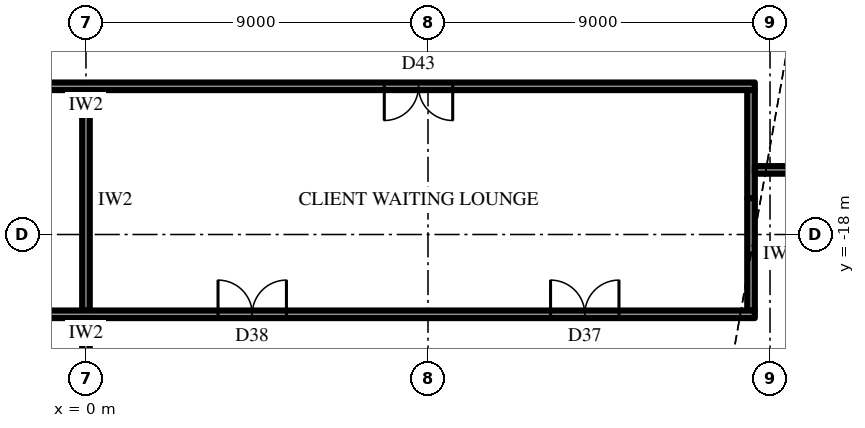
"""IFC4 building model, lengths in metres.
Left out: names, types, materials, properties, quantities, classifications, styles, units other than length and angle.
Written with IfcOpenShell. Run it as: python <this file> out.ifc"""

import sys

from ifc_helpers import new_model, si_unit, direction, frame, frame_2d, origin, place, context, subcontext, project, spatial, rectangle, extrude, element, fill, save


model = new_model("IFC4")
c1 = context("Model", 3, precision=1e-05, world=origin(), true_north=direction((0.0, 1.0)))
c2 = subcontext(c1, "Body", "Model", "MODEL_VIEW")
j1 = project(units=[si_unit("LENGTHUNIT", "METRE"), si_unit("PLANEANGLEUNIT", "RADIAN")], contexts=[c1])
p1 = place(None, origin())
s1 = spatial("IfcSite", under=j1, at=p1, CompositionType="ELEMENT")
p2 = place(p1, origin())
s2 = spatial("IfcBuilding", under=s1, at=p2, CompositionType="ELEMENT")
p3 = place(p2, frame((0.0, 0.0, 210.5)))
s3 = spatial("IfcBuildingStorey", under=s2, at=p3, CompositionType="ELEMENT", Elevation=210.5)
p4 = place(p3, frame((18.057, -26.425, 0.0), z_axis=(0.0, 0.0, 1.0), x_axis=(0.500001051461, 0.866024796723, 0.0)))
e1 = element("IfcWall", 1, at=p4, inside=s3, PredefinedType="SOLIDWALL", context=c2, shape_type="SweptSolid", body=[
    extrude(rectangle(XDim=27.713, YDim=0.3, at=frame_2d((13.856, 0.0))), origin(), (0.0, 0.0, 1.0), 2.8),
])
p5 = place(p4, frame((1.309, 0.0, 0.6)))
e2 = element("IfcOpeningElement", 2, at=p5, cuts=e1, PredefinedType="OPENING", context=c2, shape_type="SweptSolid", body=[
    extrude(rectangle(XDim=2.0, YDim=1.95, at=frame_2d((1.0, 0.975))), frame((0.0, 0.16, 0.0), z_axis=(0.0, -1.0, 0.0), x_axis=(1.0, 0.0, 0.0)), (0.0, 0.0, 1.0), 0.32),
])
p6 = place(p4, frame((5.928, 0.0, 0.6)))
e3 = element("IfcOpeningElement", 3, at=p6, cuts=e1, PredefinedType="OPENING", context=c2, shape_type="SweptSolid", body=[
    extrude(rectangle(XDim=2.0, YDim=1.95, at=frame_2d((1.0, 0.975))), frame((0.0, 0.16, 0.0), z_axis=(0.0, -1.0, 0.0), x_axis=(1.0, 0.0, 0.0)), (0.0, 0.0, 1.0), 0.32),
])
p7 = place(p4, frame((10.947, 0.0, 0.0)))
e4 = element("IfcOpeningElement", 4, at=p7, cuts=e1, PredefinedType="OPENING", context=c2, shape_type="SweptSolid", body=[
    extrude(rectangle(XDim=1.2, YDim=2.4, at=frame_2d((0.6, 1.2))), frame((0.0, 0.16, 0.0), z_axis=(0.0, -1.0, 0.0), x_axis=(1.0, 0.0, 0.0)), (0.0, 0.0, 1.0), 0.32),
])
p8 = place(p4, frame((15.166, 0.0, 0.6)))
e5 = element("IfcOpeningElement", 5, at=p8, cuts=e1, PredefinedType="OPENING", context=c2, shape_type="SweptSolid", body=[
    extrude(rectangle(XDim=2.0, YDim=1.95, at=frame_2d((1.0, 0.975))), frame((0.0, 0.16, 0.0), z_axis=(0.0, -1.0, 0.0), x_axis=(1.0, 0.0, 0.0)), (0.0, 0.0, 1.0), 0.32),
])
p9 = place(p4, frame((19.785, 0.0, 0.6)))
e6 = element("IfcOpeningElement", 6, at=p9, cuts=e1, PredefinedType="OPENING", context=c2, shape_type="SweptSolid", body=[
    extrude(rectangle(XDim=2.0, YDim=1.95, at=frame_2d((1.0, 0.975))), frame((0.0, 0.16, 0.0), z_axis=(0.0, -1.0, 0.0), x_axis=(1.0, 0.0, 0.0)), (0.0, 0.0, 1.0), 0.32),
])
p10 = place(p4, frame((24.403, 0.0, 0.6)))
e7 = element("IfcOpeningElement", 7, at=p10, cuts=e1, PredefinedType="OPENING", context=c2, shape_type="SweptSolid", body=[
    extrude(rectangle(XDim=2.0, YDim=1.95, at=frame_2d((1.0, 0.975))), frame((0.0, 0.16, 0.0), z_axis=(0.0, -1.0, 0.0), x_axis=(1.0, 0.0, 0.0)), (0.0, 0.0, 1.0), 0.32),
])
p11 = place(p3, frame((17.6, -14.1, 0.0), z_axis=(0.0, 0.0, 1.0), x_axis=(-1.0, 0.0, 0.0)))
e8 = element("IfcWall", 8, at=p11, inside=s3, PredefinedType="PARTITIONING", context=c2, shape_type="SweptSolid", body=[
    extrude(rectangle(XDim=35.2, YDim=0.2, at=frame_2d((17.6, 0.0))), origin(), (0.0, 0.0, 1.0), 4.8),
])
p12 = place(p11, frame((7.95, 0.0, 0.0)))
e9 = element("IfcOpeningElement", 9, at=p12, cuts=e8, PredefinedType="OPENING", context=c2, shape_type="SweptSolid", body=[
    extrude(rectangle(XDim=1.8, YDim=2.4, at=frame_2d((0.9, 1.2))), frame((0.0, 0.11, 0.0), z_axis=(0.0, -1.0, 0.0), x_axis=(1.0, 0.0, 0.0)), (0.0, 0.0, 1.0), 0.22),
])
p13 = place(p11, frame((25.85, 0.0, 0.0)))
e10 = element("IfcOpeningElement", 10, at=p13, cuts=e8, PredefinedType="OPENING", context=c2, shape_type="SweptSolid", body=[
    extrude(rectangle(XDim=1.0, YDim=2.2, at=frame_2d((0.5, 1.1))), frame((0.0, 0.11, 0.0), z_axis=(0.0, -1.0, 0.0), x_axis=(1.0, 0.0, 0.0)), (0.0, 0.0, 1.0), 0.22),
])
p14 = place(p3, frame((17.5, -14.2, 0.0), z_axis=(0.0, 0.0, 1.0), x_axis=(0.0, -1.0, 0.0)))
e11 = element("IfcWall", 11, at=p14, inside=s3, PredefinedType="PARTITIONING", context=c2, shape_type="SweptSolid", body=[
    extrude(rectangle(XDim=2.844, YDim=0.2, at=frame_2d((1.422, 0.0))), origin(), (0.0, 0.0, 1.0), 4.8),
])
p15 = place(p3, frame((17.5, -17.044, 0.0), z_axis=(0.0, 0.0, 1.0), x_axis=(0.0, -1.0, 0.0)))
e12 = element("IfcWall", 12, at=p15, inside=s3, PredefinedType="PARTITIONING", context=c2, shape_type="SweptSolid", body=[
    extrude(rectangle(XDim=2.956, YDim=0.2, at=frame_2d((1.478, 0.0))), origin(), (0.0, 0.0, 1.0), 3.744),
])
p16 = place(p3, frame((0.0, -14.2, 0.0), z_axis=(0.0, 0.0, 1.0), x_axis=(0.0, -1.0, 0.0)))
e13 = element("IfcWall", 13, at=p16, inside=s3, PredefinedType="PARTITIONING", context=c2, shape_type="SweptSolid", body=[
    extrude(rectangle(XDim=5.8, YDim=0.2, at=frame_2d((2.9, 0.0))), origin(), (0.0, 0.0, 1.0), 3.792),
])
p17 = place(p3, frame((17.6, -20.1, 0.0), z_axis=(0.0, 0.0, 1.0), x_axis=(-1.0, 0.0, 0.0)))
e14 = element("IfcWall", 14, at=p17, inside=s3, PredefinedType="PARTITIONING", context=c2, shape_type="SweptSolid", body=[
    extrude(rectangle(XDim=35.2, YDim=0.2, at=frame_2d((17.6, 0.0))), origin(), (0.0, 0.0, 1.0), 4.8),
])
p18 = place(p17, frame((3.575, 0.0, 0.0)))
e15 = element("IfcOpeningElement", 15, at=p18, cuts=e14, PredefinedType="OPENING", context=c2, shape_type="SweptSolid", body=[
    extrude(rectangle(XDim=1.8, YDim=2.4, at=frame_2d((0.9, 1.2))), frame((0.0, 0.11, 0.0), z_axis=(0.0, -1.0, 0.0), x_axis=(1.0, 0.0, 0.0)), (0.0, 0.0, 1.0), 0.22),
])
p19 = place(p17, frame((12.325, 0.0, 0.0)))
e16 = element("IfcOpeningElement", 16, at=p19, cuts=e14, PredefinedType="OPENING", context=c2, shape_type="SweptSolid", body=[
    extrude(rectangle(XDim=1.8, YDim=2.4, at=frame_2d((0.9, 1.2))), frame((0.0, 0.11, 0.0), z_axis=(0.0, -1.0, 0.0), x_axis=(1.0, 0.0, 0.0)), (0.0, 0.0, 1.0), 0.22),
])
p20 = place(p17, frame((25.85, 0.0, 0.0)))
e17 = element("IfcOpeningElement", 17, at=p20, cuts=e14, PredefinedType="OPENING", context=c2, shape_type="SweptSolid", body=[
    extrude(rectangle(XDim=1.0, YDim=2.2, at=frame_2d((0.5, 1.1))), frame((0.0, 0.11, 0.0), z_axis=(0.0, -1.0, 0.0), x_axis=(1.0, 0.0, 0.0)), (0.0, 0.0, 1.0), 0.22),
])
p21 = place(p3, frame((17.6, -16.3, 0.0), z_axis=(0.0, 0.0, 1.0), x_axis=(1.0, 0.0, 0.0)))
e18 = element("IfcWall", 18, at=p21, inside=s3, PredefinedType="PARTITIONING", context=c2, shape_type="SweptSolid", body=[
    extrude(rectangle(XDim=4.9, YDim=0.2, at=frame_2d((2.45, 0.0))), origin(), (0.0, 0.0, 1.0), 4.8),
])
p22 = place(p3, frame((0.0, -20.2, 0.0), z_axis=(0.0, 0.0, 1.0), x_axis=(0.0, -1.0, 0.0)))
e19 = element("IfcWall", 19, at=p22, inside=s3, PredefinedType="PARTITIONING", context=c2, shape_type="SweptSolid", body=[
    extrude(rectangle(XDim=8.61, YDim=0.2, at=frame_2d((4.305, 0.0))), origin(), (0.0, 0.0, 1.0), 3.792),
])
p23 = place(p18, frame((1.8, 0.0, 0.0), z_axis=(0.0, 0.0, 1.0), x_axis=(-1.0, 0.0, 0.0)))
e20 = element("IfcDoor", 20, at=p23, inside=s3, OperationType="DOUBLE_DOOR_SINGLE_SWING", PredefinedType="DOOR", context=c2, shape_type="SweptSolid", body=[
    extrude(rectangle(XDim=1.8, YDim=2.4, at=frame_2d((0.9, 1.2))), frame((0.0, 0.025, 0.0), z_axis=(0.0, -1.0, 0.0), x_axis=(1.0, 0.0, 0.0)), (0.0, 0.0, 1.0), 0.05),
])
fill(e15, e20)
p24 = place(p19, frame((1.8, 0.0, 0.0), z_axis=(0.0, 0.0, 1.0), x_axis=(-1.0, 0.0, 0.0)))
e21 = element("IfcDoor", 21, at=p24, inside=s3, OperationType="DOUBLE_DOOR_SINGLE_SWING", PredefinedType="DOOR", context=c2, shape_type="SweptSolid", body=[
    extrude(rectangle(XDim=1.8, YDim=2.4, at=frame_2d((0.9, 1.2))), frame((0.0, 0.025, 0.0), z_axis=(0.0, -1.0, 0.0), x_axis=(1.0, 0.0, 0.0)), (0.0, 0.0, 1.0), 0.05),
])
fill(e16, e21)
p25 = place(p12, origin())
e22 = element("IfcDoor", 22, at=p25, inside=s3, OperationType="DOUBLE_DOOR_SINGLE_SWING", PredefinedType="DOOR", context=c2, shape_type="SweptSolid", body=[
    extrude(rectangle(XDim=1.8, YDim=2.4, at=frame_2d((0.9, 1.2))), frame((0.0, 0.025, 0.0), z_axis=(0.0, -1.0, 0.0), x_axis=(1.0, 0.0, 0.0)), (0.0, 0.0, 1.0), 0.05),
])
fill(e9, e22)
save(model, sys.argv[1])
